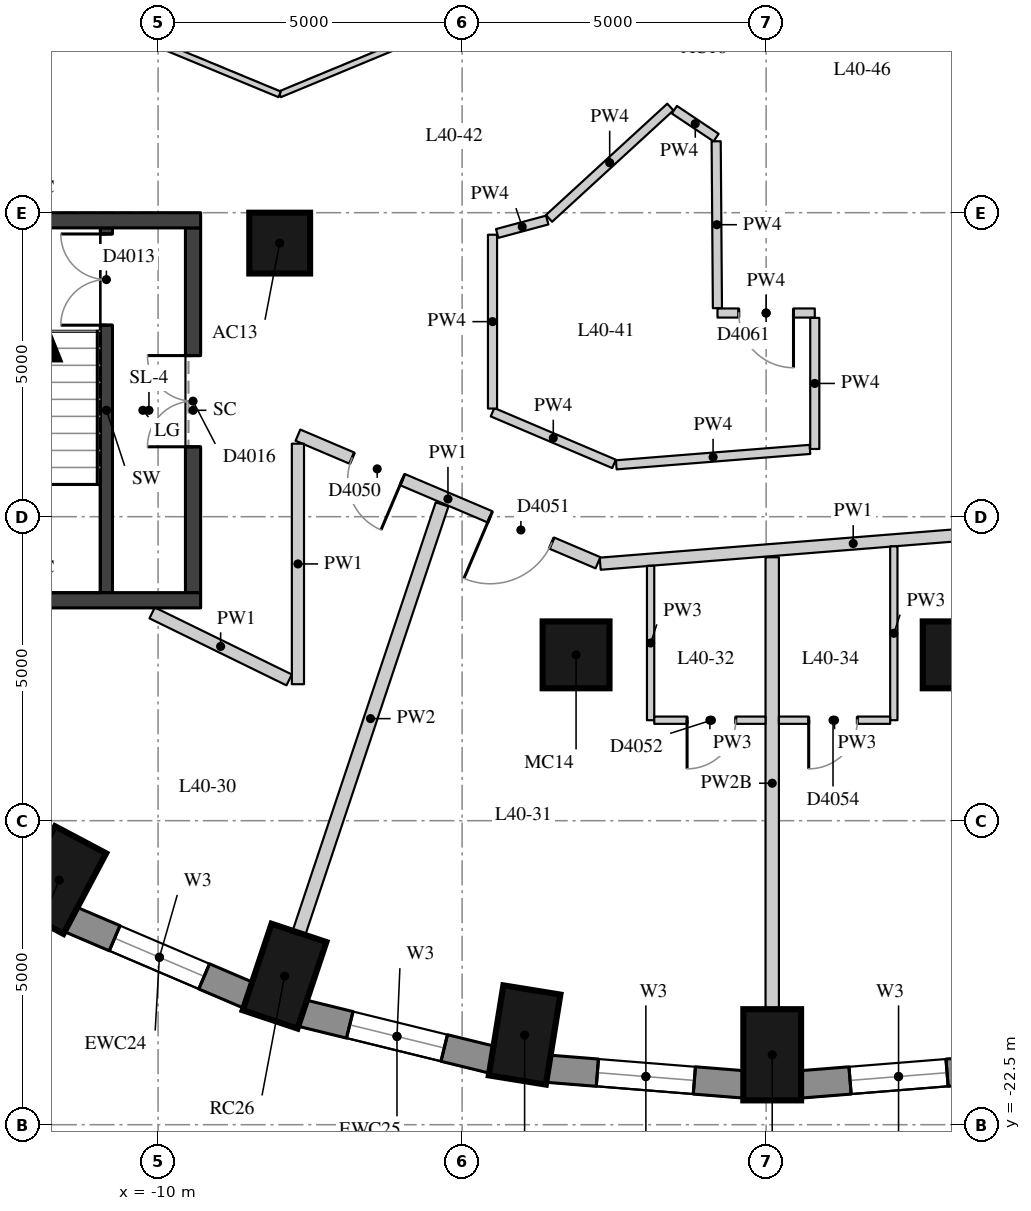
"""IFC4 building model, lengths in metres.
Left out: names, types, materials, properties, quantities, classifications, styles, units other than length and angle.
Written with IfcOpenShell. Run it as: python <this file> out.ifc"""

import sys

from ifc_helpers import new_model, si_unit, direction, frame, frame_2d, origin, origin_2d, place, context, subcontext, project, spatial, rectangle, extrude, element, fill, save


model = new_model("IFC4")
c1 = context("Model", 3, precision=1e-05, world=origin(), true_north=direction((0.0, 1.0)))
c2 = subcontext(c1, "Body", "Model", "MODEL_VIEW")
j1 = project(units=[si_unit("LENGTHUNIT", "METRE"), si_unit("PLANEANGLEUNIT", "RADIAN")], contexts=[c1])
p1 = place(None, origin())
s1 = spatial("IfcSite", under=j1, at=p1, CompositionType="ELEMENT")
p2 = place(p1, origin())
s2 = spatial("IfcBuilding", under=s1, at=p2, CompositionType="ELEMENT")
p3 = place(p2, frame((0.0, 0.0, 145.1)))
s3 = spatial("IfcBuildingStorey", under=s2, at=p3, CompositionType="ELEMENT", Elevation=145.1)
for number, where, z_axis, x_axis in (
    (1, (-11.625, -18.476, 0.0), (0.0, 0.0, 1.0), (-0.468, -0.884, 0.0)),
    (2, (-7.92, -20.056, 0.0), (0.0, 0.0, 1.0), (-0.317, -0.949, 0.0)),
    (3, (-3.972, -21.024, 0.0), (0.0, 0.0, 1.0), (-0.16, -0.987, 0.0)),
    (4, (0.1, -21.35, 0.0), (0.0, 0.0, 1.0), (0.0, -1.0, 0.0)),
):
    element("IfcColumn", number, at=place(p3, frame(where, z_axis=z_axis, x_axis=x_axis)), inside=s3, PredefinedType="COLUMN", context=c2, shape_type="SweptSolid", body=[
        extrude(rectangle(XDim=1.5, YDim=0.95, at=origin_2d()), origin(), (0.0, 0.0, 1.0), 3.3),
    ])
p4 = place(p3, frame((-8.0, -8.0, 0.0), z_axis=(0.0, 0.0, 1.0), x_axis=(1.0, 0.0, 0.0)))
e5 = element("IfcColumn", 5, at=p4, inside=s3, PredefinedType="COLUMN", context=c2, shape_type="SweptSolid", body=[
    extrude(rectangle(XDim=1.0, YDim=1.0, at=origin_2d()), origin(), (0.0, 0.0, 1.0), 3.3),
])
for number, where, z_axis, x_axis in (
    (6, (-3.126, -14.772, 0.0), (0.0, 0.0, 1.0), (1.0, 0.0, 0.0)),
    (7, (3.126, -14.772, 0.0), (0.0, 0.0, 1.0), (1.0, 0.0, 0.0)),
):
    element("IfcColumn", number, at=place(p3, frame(where, z_axis=z_axis, x_axis=x_axis)), inside=s3, PredefinedType="COLUMN", context=c2, shape_type="SweptSolid", body=[
        extrude(rectangle(XDim=1.1, YDim=1.1, at=origin_2d()), origin(), (0.0, 0.0, 1.0), 3.3),
    ])
p5 = place(p3, frame((-11.45, -19.119, 0.0), z_axis=(0.0, 0.0, 1.0), x_axis=(0.919798725687, -0.392390499663, 0.0)))
e8 = element("IfcWall", 8, at=p5, inside=s3, PredefinedType="SOLIDWALL", context=c2, shape_type="SweptSolid", body=[
    extrude(rectangle(XDim=3.2, YDim=0.45, at=frame_2d((1.6, 0.0))), origin(), (0.0, 0.0, 1.0), 3.02),
])
p6 = place(p5, frame((0.8, 0.0, 0.4)))
e9 = element("IfcOpeningElement", 9, at=p6, cuts=e8, PredefinedType="OPENING", context=c2, shape_type="SweptSolid", body=[
    extrude(rectangle(XDim=1.6, YDim=1.75, at=frame_2d((0.8, 0.875))), frame((0.0, 0.235, 0.0), z_axis=(0.0, -1.0, 0.0), x_axis=(1.0, 0.0, 0.0)), (0.0, 0.0, 1.0), 0.47),
])
p7 = place(p3, frame((-7.643, -20.662, 0.0), z_axis=(0.0, 0.0, 1.0), x_axis=(0.971232901476, -0.238131583563, 0.0)))
e10 = element("IfcWall", 10, at=p7, inside=s3, PredefinedType="SOLIDWALL", context=c2, shape_type="SweptSolid", body=[
    extrude(rectangle(XDim=3.237, YDim=0.45, at=frame_2d((1.618, 0.0))), origin(), (0.0, 0.0, 1.0), 3.02),
])
p8 = place(p7, frame((0.818, 0.0, 0.4)))
e11 = element("IfcOpeningElement", 11, at=p8, cuts=e10, PredefinedType="OPENING", context=c2, shape_type="SweptSolid", body=[
    extrude(rectangle(XDim=1.6, YDim=1.75, at=frame_2d((0.8, 0.875))), frame((0.0, 0.235, 0.0), z_axis=(0.0, -1.0, 0.0), x_axis=(1.0, 0.0, 0.0)), (0.0, 0.0, 1.0), 0.47),
])
p9 = place(p3, frame((-3.601, -21.578, 0.0), z_axis=(0.0, 0.0, 1.0), x_axis=(0.996812416891, -0.079780984773, 0.0)))
e12 = element("IfcWall", 12, at=p9, inside=s3, PredefinedType="SOLIDWALL", context=c2, shape_type="SweptSolid", body=[
    extrude(rectangle(XDim=3.256, YDim=0.45, at=frame_2d((1.628, 0.0))), origin(), (0.0, 0.0, 1.0), 3.02),
])
p10 = place(p9, frame((0.828, 0.0, 0.4)))
e13 = element("IfcOpeningElement", 13, at=p10, cuts=e12, PredefinedType="OPENING", context=c2, shape_type="SweptSolid", body=[
    extrude(rectangle(XDim=1.6, YDim=1.75, at=frame_2d((0.8, 0.875))), frame((0.0, 0.235, 0.0), z_axis=(0.0, -1.0, 0.0), x_axis=(1.0, 0.0, 0.0)), (0.0, 0.0, 1.0), 0.47),
])
p11 = place(p3, frame((0.555, -21.838, 0.0), z_axis=(0.0, 0.0, 1.0), x_axis=(0.996812416891, 0.079780984773, 0.0)))
e14 = element("IfcWall", 14, at=p11, inside=s3, PredefinedType="SOLIDWALL", context=c2, shape_type="SweptSolid", body=[
    extrude(rectangle(XDim=3.256, YDim=0.45, at=frame_2d((1.628, 0.0))), origin(), (0.0, 0.0, 1.0), 3.02),
])
p12 = place(p11, frame((0.828, 0.0, 0.4)))
e15 = element("IfcOpeningElement", 15, at=p12, cuts=e14, PredefinedType="OPENING", context=c2, shape_type="SweptSolid", body=[
    extrude(rectangle(XDim=1.6, YDim=1.75, at=frame_2d((0.8, 0.875))), frame((0.0, 0.235, 0.0), z_axis=(0.0, -1.0, 0.0), x_axis=(1.0, 0.0, 0.0)), (0.0, 0.0, 1.0), 0.47),
])
p13 = place(p3, frame((-10.85, -13.75, 0.0), z_axis=(0.0, 0.0, 1.0), x_axis=(0.0, 1.0, 0.0)))
e16 = element("IfcWall", 16, at=p13, inside=s3, PredefinedType="SHEAR", context=c2, shape_type="SweptSolid", body=[
    extrude(rectangle(XDim=6.0, YDim=0.2, at=frame_2d((3.0, 0.0))), origin(), (0.0, 0.0, 1.0), 3.02),
])
p14 = place(p13, frame((4.4, 0.0, 0.0)))
e17 = element("IfcOpeningElement", 17, at=p14, cuts=e16, PredefinedType="OPENING", context=c2, shape_type="SweptSolid", body=[
    extrude(rectangle(XDim=1.5, YDim=2.1, at=frame_2d((0.75, 1.05))), frame((0.0, 0.11, 0.0), z_axis=(0.0, -1.0, 0.0), x_axis=(1.0, 0.0, 0.0)), (0.0, 0.0, 1.0), 0.22),
])
p15 = place(p3, frame((-9.425, -13.75, -0.28), z_axis=(0.0, 0.0, 1.0), x_axis=(0.0, 1.0, 0.0)))
e18 = element("IfcWall", 18, at=p15, inside=s3, PredefinedType="SHEAR", context=c2, shape_type="SweptSolid", body=[
    extrude(rectangle(XDim=6.0, YDim=0.25, at=frame_2d((3.0, 0.0))), origin(), (0.0, 0.0, 1.0), 3.3),
])
p16 = place(p15, frame((2.4, 0.0, 0.28)))
e19 = element("IfcOpeningElement", 19, at=p16, cuts=e18, PredefinedType="OPENING", context=c2, shape_type="SweptSolid", body=[
    extrude(rectangle(XDim=1.5, YDim=2.1, at=frame_2d((0.75, 1.05))), frame((0.0, 0.135, 0.0), z_axis=(0.0, -1.0, 0.0), x_axis=(1.0, 0.0, 0.0)), (0.0, 0.0, 1.0), 0.27),
])
for number, where, z_axis, x_axis in (
    (20, (-14.5, -7.625, -0.28), (0.0, 0.0, 1.0), (1.0, 0.0, 0.0)),
    (21, (-14.5, -13.875, -0.28), (0.0, 0.0, 1.0), (1.0, 0.0, 0.0)),
):
    element("IfcWall", number, at=place(p3, frame(where, z_axis=z_axis, x_axis=x_axis)), inside=s3, PredefinedType="SHEAR", context=c2, shape_type="SweptSolid", body=[
        extrude(rectangle(XDim=5.2, YDim=0.25, at=frame_2d((2.6, 0.0))), origin(), (0.0, 0.0, 1.0), 3.3),
    ])
p17 = place(p3, frame((5.593, -12.609, 0.0), z_axis=(0.0, 0.0, 1.0), x_axis=(-0.99682930336, -0.079569717626, 0.0)))
e22 = element("IfcWall", 22, at=p17, inside=s3, PredefinedType="PARTITIONING", context=c2, shape_type="SweptSolid", body=[
    extrude(rectangle(XDim=8.349, YDim=0.2, at=frame_2d((4.174, 0.0))), origin(), (0.0, 0.0, 1.0), 3.02),
])
p18 = place(p17, frame((1.232, 0.0, 0.0)))
e23 = element("IfcOpeningElement", 23, at=p18, cuts=e22, PredefinedType="OPENING", context=c2, shape_type="SweptSolid", body=[
    extrude(rectangle(XDim=1.1, YDim=2.1, at=frame_2d((0.55, 1.05))), frame((0.0, 0.11, 0.0), z_axis=(0.0, -1.0, 0.0), x_axis=(1.0, 0.0, 0.0)), (0.0, 0.0, 1.0), 0.22),
])
p19 = place(p3, frame((-2.766, -13.258, 0.0), z_axis=(0.0, 0.0, 1.0), x_axis=(-0.920210819037, 0.391423106787, 0.0)))
e24 = element("IfcWall", 24, at=p19, inside=s3, PredefinedType="PARTITIONING", context=c2, shape_type="SweptSolid", body=[
    extrude(rectangle(XDim=5.362, YDim=0.2, at=frame_2d((2.681, 0.0))), origin(), (0.0, 0.0, 1.0), 3.02),
])
p20 = place(p19, frame((3.495, 0.0, 0.0)))
e25 = element("IfcOpeningElement", 25, at=p20, cuts=e24, PredefinedType="OPENING", context=c2, shape_type="SweptSolid", body=[
    extrude(rectangle(XDim=0.9, YDim=2.1, at=frame_2d((0.45, 1.05))), frame((0.0, 0.11, 0.0), z_axis=(0.0, -1.0, 0.0), x_axis=(1.0, 0.0, 0.0)), (0.0, 0.0, 1.0), 0.22),
])
p21 = place(p19, frame((0.827, 0.0, 0.0)))
e26 = element("IfcOpeningElement", 26, at=p21, cuts=e24, PredefinedType="OPENING", context=c2, shape_type="SweptSolid", body=[
    extrude(rectangle(XDim=1.1, YDim=2.1, at=frame_2d((0.55, 1.05))), frame((0.0, 0.11, 0.0), z_axis=(0.0, -1.0, 0.0), x_axis=(1.0, 0.0, 0.0)), (0.0, 0.0, 1.0), 0.22),
])
p22 = place(p3, frame((-7.7, -11.299, 0.0), z_axis=(0.0, 0.0, 1.0), x_axis=(0.0, -1.0, 0.0)))
e27 = element("IfcWall", 27, at=p22, inside=s3, PredefinedType="PARTITIONING", context=c2, shape_type="SweptSolid", body=[
    extrude(rectangle(XDim=3.956, YDim=0.2, at=frame_2d((1.978, 0.0))), origin(), (0.0, 0.0, 1.0), 3.02),
])
p23 = place(p3, frame((-7.844, -15.185, 0.0), z_axis=(0.0, 0.0, 1.0), x_axis=(-0.898266579534, 0.439450966653, 0.0)))
e28 = element("IfcWall", 28, at=p23, inside=s3, PredefinedType="PARTITIONING", context=c2, shape_type="SweptSolid", body=[
    extrude(rectangle(XDim=2.509, YDim=0.2, at=frame_2d((1.254, 0.0))), origin(), (0.0, 0.0, 1.0), 3.02),
])
p24 = place(p3, frame((-0.8, -9.15, 0.0), z_axis=(0.0, 0.0, 1.0), x_axis=(1.0, 0.0, 0.0)))
e29 = element("IfcWall", 29, at=p24, inside=s3, PredefinedType="PARTITIONING", context=c2, shape_type="SweptSolid", body=[
    extrude(rectangle(XDim=1.6, YDim=0.15, at=frame_2d((0.8, 0.0))), origin(), (0.0, 0.0, 1.0), 3.02),
])
p25 = place(p24, frame((0.35, 0.0, 0.0)))
e30 = element("IfcOpeningElement", 30, at=p25, cuts=e29, PredefinedType="OPENING", context=c2, shape_type="SweptSolid", body=[
    extrude(rectangle(XDim=0.9, YDim=2.1, at=frame_2d((0.45, 1.05))), frame((0.0, 0.085, 0.0), z_axis=(0.0, -1.0, 0.0), x_axis=(1.0, 0.0, 0.0)), (0.0, 0.0, 1.0), 0.17),
])
p26 = place(p3, frame((0.8, -9.23, 0.0), z_axis=(0.0, 0.0, 1.0), x_axis=(0.0, -1.0, 0.0)))
e31 = element("IfcWall", 31, at=p26, inside=s3, PredefinedType="PARTITIONING", context=c2, shape_type="SweptSolid", body=[
    extrude(rectangle(XDim=2.156, YDim=0.15, at=frame_2d((1.078, 0.0))), origin(), (0.0, 0.0, 1.0), 3.02),
])
p27 = place(p3, frame((0.72, -11.393, 0.0), z_axis=(0.0, 0.0, 1.0), x_axis=(-0.996836626024, -0.079477927865, 0.0)))
e32 = element("IfcWall", 32, at=p27, inside=s3, PredefinedType="PARTITIONING", context=c2, shape_type="SweptSolid", body=[
    extrude(rectangle(XDim=3.195, YDim=0.15, at=frame_2d((1.597, 0.0))), origin(), (0.0, 0.0, 1.0), 3.02),
])
p28 = place(p3, frame((-2.501, -11.631, 0.0), z_axis=(0.0, 0.0, 1.0), x_axis=(-0.920228720371, 0.391381019217, 0.0)))
e33 = element("IfcWall", 33, at=p28, inside=s3, PredefinedType="PARTITIONING", context=c2, shape_type="SweptSolid", body=[
    extrude(rectangle(XDim=2.172, YDim=0.15, at=frame_2d((1.086, 0.0))), origin(), (0.0, 0.0, 1.0), 3.02),
])
p29 = place(p3, frame((-4.5, -10.721, 0.0), z_axis=(0.0, 0.0, 1.0), x_axis=(0.0, 1.0, 0.0)))
e34 = element("IfcWall", 34, at=p29, inside=s3, PredefinedType="PARTITIONING", context=c2, shape_type="SweptSolid", body=[
    extrude(rectangle(XDim=2.859, YDim=0.15, at=frame_2d((1.43, 0.0))), origin(), (0.0, 0.0, 1.0), 3.02),
])
p30 = place(p3, frame((-4.423, -7.842, 0.0), z_axis=(0.0, 0.0, 1.0), x_axis=(0.965853333569, 0.259089440221, 0.0)))
e35 = element("IfcWall", 35, at=p30, inside=s3, PredefinedType="PARTITIONING", context=c2, shape_type="SweptSolid", body=[
    extrude(rectangle(XDim=0.852, YDim=0.15, at=frame_2d((0.426, 0.0))), origin(), (0.0, 0.0, 1.0), 3.02),
])
p31 = place(p3, frame((-3.571, -7.594, 0.0), z_axis=(0.0, 0.0, 1.0), x_axis=(0.736783660812, 0.676128565555, 0.0)))
e36 = element("IfcWall", 36, at=p31, inside=s3, PredefinedType="PARTITIONING", context=c2, shape_type="SweptSolid", body=[
    extrude(rectangle(XDim=2.709, YDim=0.15, at=frame_2d((1.354, 0.0))), origin(), (0.0, 0.0, 1.0), 3.02),
])
p32 = place(p3, frame((-1.509, -5.806, 0.0), z_axis=(0.0, 0.0, 1.0), x_axis=(0.831367153095, -0.55572354346, 0.0)))
e37 = element("IfcWall", 37, at=p32, inside=s3, PredefinedType="PARTITIONING", context=c2, shape_type="SweptSolid", body=[
    extrude(rectangle(XDim=0.825, YDim=0.15, at=frame_2d((0.413, 0.0))), origin(), (0.0, 0.0, 1.0), 3.02),
])
p33 = place(p3, frame((-0.822, -6.325, 0.0), z_axis=(0.0, 0.0, 1.0), x_axis=(0.007471771501, -0.999972085926, 0.0)))
e38 = element("IfcWall", 38, at=p33, inside=s3, PredefinedType="PARTITIONING", context=c2, shape_type="SweptSolid", body=[
    extrude(rectangle(XDim=2.745, YDim=0.15, at=frame_2d((1.372, 0.0))), origin(), (0.0, 0.0, 1.0), 3.02),
])
p34 = place(p3, frame((-7.683, -19.345, 0.0), z_axis=(0.0, 0.0, 1.0), x_axis=(0.316720596973, 0.948518878807, 0.0)))
e39 = element("IfcWall", 39, at=p34, inside=s3, PredefinedType="PARTITIONING", context=c2, shape_type="SweptSolid", body=[
    extrude(rectangle(XDim=7.43, YDim=0.22, at=frame_2d((3.715, 0.0))), origin(), (0.0, 0.0, 1.0), 3.02),
])
p35 = place(p3, frame((0.1, -20.6, 0.0), z_axis=(0.0, 0.0, 1.0), x_axis=(0.0, 1.0, 0.0)))
e40 = element("IfcWall", 40, at=p35, inside=s3, PredefinedType="PARTITIONING", context=c2, shape_type="SweptSolid", body=[
    extrude(rectangle(XDim=7.433, YDim=0.22, at=frame_2d((3.716, 0.0))), origin(), (0.0, 0.0, 1.0), 2.57),
])
p36 = place(p3, frame((-1.9, -13.307, 0.0), z_axis=(0.0, 0.0, 1.0), x_axis=(0.0, -1.0, 0.0)))
e41 = element("IfcWall", 41, at=p36, inside=s3, PredefinedType="PARTITIONING", context=c2, shape_type="SweptSolid", body=[
    extrude(rectangle(XDim=2.54, YDim=0.12, at=frame_2d((1.27, 0.0))), origin(), (0.0, 0.0, 1.0), 3.02),
])
p37 = place(p3, frame((2.1, -12.988, 0.0), z_axis=(0.0, 0.0, 1.0), x_axis=(0.0, -1.0, 0.0)))
e42 = element("IfcWall", 42, at=p37, inside=s3, PredefinedType="PARTITIONING", context=c2, shape_type="SweptSolid", body=[
    extrude(rectangle(XDim=2.859, YDim=0.12, at=frame_2d((1.43, 0.0))), origin(), (0.0, 0.0, 1.0), 3.02),
])
p38 = place(p3, frame((-1.84, -15.847, 0.0), z_axis=(0.0, 0.0, 1.0), x_axis=(1.0, 0.0, 0.0)))
e43 = element("IfcWall", 43, at=p38, inside=s3, PredefinedType="PARTITIONING", context=c2, shape_type="SweptSolid", body=[
    extrude(rectangle(XDim=1.83, YDim=0.12, at=frame_2d((0.915, 0.0))), origin(), (0.0, 0.0, 1.0), 3.02),
])
p39 = place(p38, frame((0.54, 0.0, 0.0)))
e44 = element("IfcOpeningElement", 44, at=p39, cuts=e43, PredefinedType="OPENING", context=c2, shape_type="SweptSolid", body=[
    extrude(rectangle(XDim=0.8, YDim=2.1, at=frame_2d((0.4, 1.05))), frame((0.0, 0.07, 0.0), z_axis=(0.0, -1.0, 0.0), x_axis=(1.0, 0.0, 0.0)), (0.0, 0.0, 1.0), 0.14),
])
p40 = place(p3, frame((2.04, -15.847, 0.0), z_axis=(0.0, 0.0, 1.0), x_axis=(-1.0, 0.0, 0.0)))
e45 = element("IfcWall", 45, at=p40, inside=s3, PredefinedType="PARTITIONING", context=c2, shape_type="SweptSolid", body=[
    extrude(rectangle(XDim=1.83, YDim=0.12, at=frame_2d((0.915, 0.0))), origin(), (0.0, 0.0, 1.0), 3.02),
])
p41 = place(p40, frame((0.54, 0.0, 0.0)))
e46 = element("IfcOpeningElement", 46, at=p41, cuts=e45, PredefinedType="OPENING", context=c2, shape_type="SweptSolid", body=[
    extrude(rectangle(XDim=0.8, YDim=2.1, at=frame_2d((0.4, 1.05))), frame((0.0, 0.07, 0.0), z_axis=(0.0, -1.0, 0.0), x_axis=(1.0, 0.0, 0.0)), (0.0, 0.0, 1.0), 0.14),
])
for number, where, z_axis, x_axis in (
    (47, (-4.073, -3.927, 0.0), (0.0, 0.0, 1.0), (-0.924, -0.383, 0.0)),
    (48, (-8.0, -5.554, 0.0), (0.0, 0.0, 1.0), (-0.924, 0.383, 0.0)),
):
    element("IfcWall", number, at=place(p3, frame(where, z_axis=z_axis, x_axis=x_axis)), inside=s3, PredefinedType="PARTITIONING", context=c2, shape_type="SweptSolid", body=[
        extrude(rectangle(XDim=4.251, YDim=0.1, at=frame_2d((2.125, 0.0))), origin(), (0.0, 0.0, 1.0), 3.02),
    ])
p42 = place(p6, origin())
e49 = element("IfcWindow", 49, at=p42, inside=s3, PartitioningType="SINGLE_PANEL", PredefinedType="WINDOW", context=c2, shape_type="SweptSolid", body=[
    extrude(rectangle(XDim=1.6, YDim=1.75, at=frame_2d((0.8, 0.875))), frame((0.0, 0.035, 0.0), z_axis=(0.0, -1.0, 0.0), x_axis=(1.0, 0.0, 0.0)), (0.0, 0.0, 1.0), 0.06),
])
fill(e9, e49)
p43 = place(p8, origin())
e50 = element("IfcWindow", 50, at=p43, inside=s3, PartitioningType="SINGLE_PANEL", PredefinedType="WINDOW", context=c2, shape_type="SweptSolid", body=[
    extrude(rectangle(XDim=1.6, YDim=1.75, at=frame_2d((0.8, 0.875))), frame((0.0, 0.035, 0.0), z_axis=(0.0, -1.0, 0.0), x_axis=(1.0, 0.0, 0.0)), (0.0, 0.0, 1.0), 0.06),
])
fill(e11, e50)
p44 = place(p10, origin())
e51 = element("IfcWindow", 51, at=p44, inside=s3, PartitioningType="SINGLE_PANEL", PredefinedType="WINDOW", context=c2, shape_type="SweptSolid", body=[
    extrude(rectangle(XDim=1.6, YDim=1.75, at=frame_2d((0.8, 0.875))), frame((0.0, 0.035, 0.0), z_axis=(0.0, -1.0, 0.0), x_axis=(1.0, 0.0, 0.0)), (0.0, 0.0, 1.0), 0.06),
])
fill(e13, e51)
p45 = place(p12, origin())
e52 = element("IfcWindow", 52, at=p45, inside=s3, PartitioningType="SINGLE_PANEL", PredefinedType="WINDOW", context=c2, shape_type="SweptSolid", body=[
    extrude(rectangle(XDim=1.6, YDim=1.75, at=frame_2d((0.8, 0.875))), frame((0.0, 0.035, 0.0), z_axis=(0.0, -1.0, 0.0), x_axis=(1.0, 0.0, 0.0)), (0.0, 0.0, 1.0), 0.06),
])
fill(e15, e52)
p46 = place(p14, origin())
e53 = element("IfcDoor", 53, at=p46, inside=s3, OperationType="DOUBLE_DOOR_SINGLE_SWING", PredefinedType="DOOR", context=c2, shape_type="SweptSolid", body=[
    extrude(rectangle(XDim=1.5, YDim=2.1, at=frame_2d((0.75, 1.05))), frame((0.0, 0.025, 0.0), z_axis=(0.0, -1.0, 0.0), x_axis=(1.0, 0.0, 0.0)), (0.0, 0.0, 1.0), 0.05),
])
fill(e17, e53)
p47 = place(p16, origin())
e54 = element("IfcDoor", 54, at=p47, inside=s3, OperationType="DOUBLE_DOOR_SINGLE_SWING", PredefinedType="DOOR", context=c2, shape_type="SweptSolid", body=[
    extrude(rectangle(XDim=1.5, YDim=2.1, at=frame_2d((0.75, 1.05))), frame((0.0, 0.025, 0.0), z_axis=(0.0, -1.0, 0.0), x_axis=(1.0, 0.0, 0.0)), (0.0, 0.0, 1.0), 0.05),
])
fill(e19, e54)
p48 = place(p20, origin())
e55 = element("IfcDoor", 55, at=p48, inside=s3, OperationType="SINGLE_SWING_LEFT", PredefinedType="DOOR", context=c2, shape_type="SweptSolid", body=[
    extrude(rectangle(XDim=0.9, YDim=2.1, at=frame_2d((0.45, 1.05))), frame((0.0, 0.025, 0.0), z_axis=(0.0, -1.0, 0.0), x_axis=(1.0, 0.0, 0.0)), (0.0, 0.0, 1.0), 0.05),
])
fill(e25, e55)
p49 = place(p21, origin())
e56 = element("IfcDoor", 56, at=p49, inside=s3, OperationType="SINGLE_SWING_RIGHT", PredefinedType="DOOR", context=c2, shape_type="SweptSolid", body=[
    extrude(rectangle(XDim=1.1, YDim=2.1, at=frame_2d((0.55, 1.05))), frame((0.0, 0.025, 0.0), z_axis=(0.0, -1.0, 0.0), x_axis=(1.0, 0.0, 0.0)), (0.0, 0.0, 1.0), 0.05),
])
fill(e26, e56)
p50 = place(p39, origin())
e57 = element("IfcDoor", 57, at=p50, inside=s3, OperationType="SINGLE_SWING_RIGHT", PredefinedType="DOOR", context=c2, shape_type="SweptSolid", body=[
    extrude(rectangle(XDim=0.8, YDim=2.1, at=frame_2d((0.4, 1.05))), frame((0.0, 0.025, 0.0), z_axis=(0.0, -1.0, 0.0), x_axis=(1.0, 0.0, 0.0)), (0.0, 0.0, 1.0), 0.05),
])
fill(e44, e57)
p51 = place(p41, origin())
e58 = element("IfcDoor", 58, at=p51, inside=s3, OperationType="SINGLE_SWING_RIGHT", PredefinedType="DOOR", context=c2, shape_type="SweptSolid", body=[
    extrude(rectangle(XDim=0.8, YDim=2.1, at=frame_2d((0.4, 1.05))), frame((0.0, 0.025, 0.0), z_axis=(0.0, -1.0, 0.0), x_axis=(1.0, 0.0, 0.0)), (0.0, 0.0, 1.0), 0.05),
])
fill(e46, e58)
p52 = place(p25, origin())
e59 = element("IfcDoor", 59, at=p52, inside=s3, OperationType="SINGLE_SWING_LEFT", PredefinedType="DOOR", context=c2, shape_type="SweptSolid", body=[
    extrude(rectangle(XDim=0.9, YDim=2.1, at=frame_2d((0.45, 1.05))), frame((0.0, 0.025, 0.0), z_axis=(0.0, -1.0, 0.0), x_axis=(1.0, 0.0, 0.0)), (0.0, 0.0, 1.0), 0.05),
])
fill(e30, e59)
save(model, sys.argv[1])
